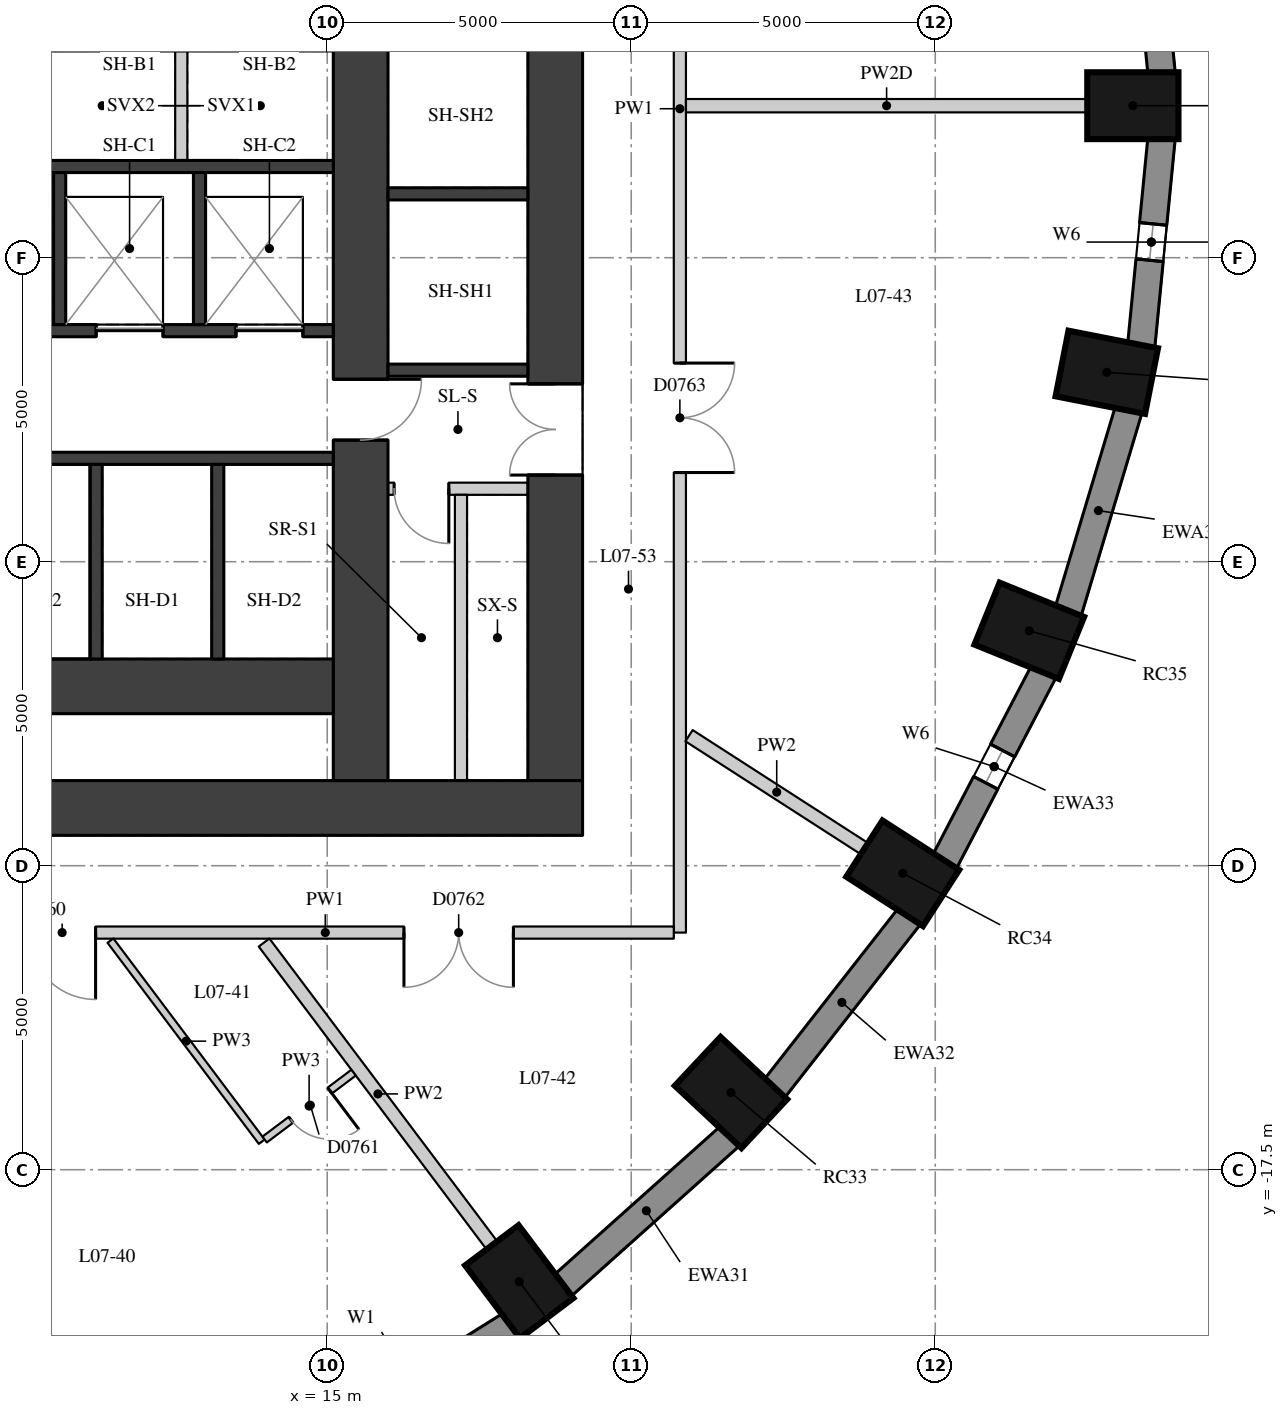
"""IFC4 building model, lengths in metres.
Left out: names, types, materials, properties, quantities, classifications, styles, units other than length and angle.
Written with IfcOpenShell. Run it as: python <this file> out.ifc"""

import sys

from ifc_helpers import new_model, si_unit, direction, frame, frame_2d, origin, origin_2d, place, context, subcontext, project, spatial, rectangle, extrude, element, fill, save


model = new_model("IFC4")
c1 = context("Model", 3, precision=1e-05, world=origin(), true_north=direction((0.0, 1.0)))
c2 = subcontext(c1, "Body", "Model", "MODEL_VIEW")
j1 = project(units=[si_unit("LENGTHUNIT", "METRE"), si_unit("PLANEANGLEUNIT", "RADIAN")], contexts=[c1])
p1 = place(None, origin())
s1 = spatial("IfcSite", under=j1, at=p1, CompositionType="ELEMENT")
p2 = place(p1, origin())
s2 = spatial("IfcBuilding", under=s1, at=p2, CompositionType="ELEMENT")
p3 = place(p2, frame((0.0, 0.0, 31.6)))
s3 = spatial("IfcBuildingStorey", under=s2, at=p3, CompositionType="ELEMENT", Elevation=31.6)
for number, where, z_axis, x_axis in (
    (1, (28.25, 0.0, 0.0), (0.0, 0.0, 1.0), (1.0, 0.0, 0.0)),
    (2, (18.159, -19.343, 0.0), (0.0, 0.0, 1.0), (0.601, -0.799, 0.0)),
    (3, (21.641, -16.23, 0.0), (0.0, 0.0, 1.0), (0.73, -0.683, 0.0)),
    (4, (24.465, -12.625, 0.0), (0.0, 0.0, 1.0), (0.841, -0.541, 0.0)),
    (5, (26.546, -8.636, 0.0), (0.0, 0.0, 1.0), (0.927, -0.376, 0.0)),
    (6, (27.821, -4.385, 0.0), (0.0, 0.0, 1.0), (0.981, -0.193, 0.0)),
):
    element("IfcColumn", number, at=place(p3, frame(where, z_axis=z_axis, x_axis=x_axis)), inside=s3, PredefinedType="COLUMN", context=c2, shape_type="SweptSolid", body=[
        extrude(rectangle(XDim=1.5, YDim=1.1, at=origin_2d()), origin(), (0.0, 0.0, 1.0), 3.3),
    ])
p4 = place(p3, frame((28.722, 0.53, 0.0), z_axis=(0.0, 0.0, 1.0), x_axis=(-0.097389581596, 0.995246336038, 0.0)))
e7 = element("IfcWall", 7, at=p4, inside=s3, PredefinedType="SOLIDWALL", context=c2, shape_type="SweptSolid", body=[
    extrude(rectangle(XDim=3.442, YDim=0.45, at=frame_2d((1.721, 0.0))), origin(), (0.0, 0.0, 1.0), 3.02),
])
p5 = place(p3, frame((14.817, -22.051, 0.0), z_axis=(0.0, 0.0, 1.0), x_axis=(0.847635480093, 0.530579016629, 0.0)))
e8 = element("IfcWall", 8, at=p5, inside=s3, PredefinedType="SOLIDWALL", context=c2, shape_type="SweptSolid", body=[
    extrude(rectangle(XDim=3.782, YDim=0.45, at=frame_2d((1.891, 0.0))), origin(), (0.0, 0.0, 1.0), 3.02),
])
p6 = place(p5, frame((0.791, 0.0, 0.4)))
e9 = element("IfcOpeningElement", 9, at=p6, cuts=e8, PredefinedType="OPENING", context=c2, shape_type="SweptSolid", body=[
    extrude(rectangle(XDim=2.2, YDim=1.75, at=frame_2d((1.1, 0.875))), frame((0.0, 0.235, 0.0), z_axis=(0.0, -1.0, 0.0), x_axis=(1.0, 0.0, 0.0)), (0.0, 0.0, 1.0), 0.47),
])
p7 = place(p3, frame((18.871, -19.407, 0.0), z_axis=(0.0, 0.0, 1.0), x_axis=(0.745526233716, 0.66647628228, 0.0)))
e10 = element("IfcWall", 10, at=p7, inside=s3, PredefinedType="SOLIDWALL", context=c2, shape_type="SweptSolid", body=[
    extrude(rectangle(XDim=3.697, YDim=0.45, at=frame_2d((1.848, 0.0))), origin(), (0.0, 0.0, 1.0), 3.02),
])
p8 = place(p3, frame((22.352, -16.17, 0.0), z_axis=(0.0, 0.0, 1.0), x_axis=(0.616661975264, 0.787228053529, 0.0)))
e11 = element("IfcWall", 11, at=p8, inside=s3, PredefinedType="SOLIDWALL", context=c2, shape_type="SweptSolid", body=[
    extrude(rectangle(XDim=3.61, YDim=0.45, at=frame_2d((1.805, 0.0))), origin(), (0.0, 0.0, 1.0), 3.02),
])
p9 = place(p3, frame((25.152, -12.437, 0.0), z_axis=(0.0, 0.0, 1.0), x_axis=(0.462492775226, 0.886623050041, 0.0)))
e12 = element("IfcWall", 12, at=p9, inside=s3, PredefinedType="SOLIDWALL", context=c2, shape_type="SweptSolid", body=[
    extrude(rectangle(XDim=3.532, YDim=0.45, at=frame_2d((1.766, 0.0))), origin(), (0.0, 0.0, 1.0), 3.02),
])
p10 = place(p9, frame((1.466, 0.0, 0.4)))
e13 = element("IfcOpeningElement", 13, at=p10, cuts=e12, PredefinedType="OPENING", context=c2, shape_type="SweptSolid", body=[
    extrude(rectangle(XDim=0.6, YDim=1.75, at=frame_2d((0.3, 0.875))), frame((0.0, 0.235, 0.0), z_axis=(0.0, -1.0, 0.0), x_axis=(1.0, 0.0, 0.0)), (0.0, 0.0, 1.0), 0.47),
])
p11 = place(p3, frame((27.185, -8.323, 0.0), z_axis=(0.0, 0.0, 1.0), x_axis=(0.287064133733, 0.957911364963, 0.0)))
e14 = element("IfcWall", 14, at=p11, inside=s3, PredefinedType="SOLIDWALL", context=c2, shape_type="SweptSolid", body=[
    extrude(rectangle(XDim=3.473, YDim=0.45, at=frame_2d((1.737, 0.0))), origin(), (0.0, 0.0, 1.0), 3.02),
])
p12 = place(p3, frame((28.387, -3.956, 0.0), z_axis=(0.0, 0.0, 1.0), x_axis=(0.097389581596, 0.995246336038, 0.0)))
e15 = element("IfcWall", 15, at=p12, inside=s3, PredefinedType="SOLIDWALL", context=c2, shape_type="SweptSolid", body=[
    extrude(rectangle(XDim=3.442, YDim=0.45, at=frame_2d((1.721, 0.0))), origin(), (0.0, 0.0, 1.0), 3.02),
])
p13 = place(p12, frame((1.421, 0.0, 0.4)))
e16 = element("IfcOpeningElement", 16, at=p13, cuts=e15, PredefinedType="OPENING", context=c2, shape_type="SweptSolid", body=[
    extrude(rectangle(XDim=0.6, YDim=1.75, at=frame_2d((0.3, 0.875))), frame((0.0, 0.235, 0.0), z_axis=(0.0, -1.0, 0.0), x_axis=(1.0, 0.0, 0.0)), (0.0, 0.0, 1.0), 0.47),
])
p14 = place(p3, frame((18.75, -11.1, 0.0), z_axis=(0.0, 0.0, 1.0), x_axis=(0.0, 1.0, 0.0)))
e17 = element("IfcWall", 17, at=p14, inside=s3, PredefinedType="SHEAR", context=c2, shape_type="SweptSolid", body=[
    extrude(rectangle(XDim=22.2, YDim=0.9, at=frame_2d((11.1, 0.0))), origin(), (0.0, 0.0, 1.0), 3.02),
])
p15 = place(p14, frame((16.175, 0.0, 0.0)))
e18 = element("IfcOpeningElement", 18, at=p15, cuts=e17, PredefinedType="OPENING", context=c2, shape_type="SweptSolid", body=[
    extrude(rectangle(XDim=1.5, YDim=2.1, at=frame_2d((0.75, 1.05))), frame((0.0, 0.46, 0.0), z_axis=(0.0, -1.0, 0.0), x_axis=(1.0, 0.0, 0.0)), (0.0, 0.0, 1.0), 0.92),
])
p16 = place(p14, frame((5.025, 0.0, 0.0)))
e19 = element("IfcOpeningElement", 19, at=p16, cuts=e17, PredefinedType="OPENING", context=c2, shape_type="SweptSolid", body=[
    extrude(rectangle(XDim=1.5, YDim=2.1, at=frame_2d((0.75, 1.05))), frame((0.0, 0.46, 0.0), z_axis=(0.0, -1.0, 0.0), x_axis=(1.0, 0.0, 0.0)), (0.0, 0.0, 1.0), 0.92),
])
p17 = place(p3, frame((4.0, -11.55, 0.0), z_axis=(0.0, 0.0, 1.0), x_axis=(1.0, 0.0, 0.0)))
e20 = element("IfcWall", 20, at=p17, inside=s3, PredefinedType="SHEAR", context=c2, shape_type="SweptSolid", body=[
    extrude(rectangle(XDim=15.2, YDim=0.9, at=frame_2d((7.6, 0.0))), origin(), (0.0, 0.0, 1.0), 3.02),
])
p18 = place(p3, frame((15.55, -11.1, 0.0), z_axis=(0.0, 0.0, 1.0), x_axis=(0.0, 1.0, 0.0)))
e21 = element("IfcWall", 21, at=p18, inside=s3, PredefinedType="SHEAR", context=c2, shape_type="SweptSolid", body=[
    extrude(rectangle(XDim=22.2, YDim=0.9, at=frame_2d((11.1, 0.0))), origin(), (0.0, 0.0, 1.0), 3.02),
])
p19 = place(p18, frame((15.6, 0.0, 0.0)))
e22 = element("IfcOpeningElement", 22, at=p19, cuts=e21, PredefinedType="OPENING", context=c2, shape_type="SweptSolid", body=[
    extrude(rectangle(XDim=1.0, YDim=2.1, at=frame_2d((0.5, 1.05))), frame((0.0, 0.46, 0.0), z_axis=(0.0, -1.0, 0.0), x_axis=(1.0, 0.0, 0.0)), (0.0, 0.0, 1.0), 0.92),
])
p20 = place(p18, frame((5.6, 0.0, 0.0)))
e23 = element("IfcOpeningElement", 23, at=p20, cuts=e21, PredefinedType="OPENING", context=c2, shape_type="SweptSolid", body=[
    extrude(rectangle(XDim=1.0, YDim=2.1, at=frame_2d((0.5, 1.05))), frame((0.0, 0.46, 0.0), z_axis=(0.0, -1.0, 0.0), x_axis=(1.0, 0.0, 0.0)), (0.0, 0.0, 1.0), 0.92),
])
p21 = place(p3, frame((4.9, -9.55, 0.0), z_axis=(0.0, 0.0, 1.0), x_axis=(1.0, 0.0, 0.0)))
e24 = element("IfcWall", 24, at=p21, inside=s3, PredefinedType="SHEAR", context=c2, shape_type="SweptSolid", body=[
    extrude(rectangle(XDim=10.2, YDim=0.9, at=frame_2d((5.1, 0.0))), origin(), (0.0, 0.0, 1.0), 3.02),
])
p22 = place(p3, frame((4.9, -1.0, 0.0), z_axis=(0.0, 0.0, 1.0), x_axis=(1.0, 0.0, 0.0)))
e25 = element("IfcWall", 25, at=p22, inside=s3, PredefinedType="SHEAR", context=c2, shape_type="SweptSolid", body=[
    extrude(rectangle(XDim=10.2, YDim=0.2, at=frame_2d((5.1, 0.0))), origin(), (0.0, 0.0, 1.0), 3.02),
])
p23 = place(p3, frame((4.9, -3.7, 0.0), z_axis=(0.0, 0.0, 1.0), x_axis=(1.0, 0.0, 0.0)))
e26 = element("IfcWall", 26, at=p23, inside=s3, PredefinedType="SHEAR", context=c2, shape_type="SweptSolid", body=[
    extrude(rectangle(XDim=10.2, YDim=0.2, at=frame_2d((5.1, 0.0))), origin(), (0.0, 0.0, 1.0), 3.02),
])
p24 = place(p23, frame((6.3, 0.0, 0.0)))
e27 = element("IfcOpeningElement", 27, at=p24, cuts=e26, PredefinedType="OPENING", context=c2, shape_type="SweptSolid", body=[
    extrude(rectangle(XDim=1.1, YDim=2.1, at=frame_2d((0.55, 1.05))), frame((0.0, 0.11, 0.0), z_axis=(0.0, -1.0, 0.0), x_axis=(1.0, 0.0, 0.0)), (0.0, 0.0, 1.0), 0.22),
])
p25 = place(p23, frame((8.6, 0.0, 0.0)))
e28 = element("IfcOpeningElement", 28, at=p25, cuts=e26, PredefinedType="OPENING", context=c2, shape_type="SweptSolid", body=[
    extrude(rectangle(XDim=1.1, YDim=2.1, at=frame_2d((0.55, 1.05))), frame((0.0, 0.11, 0.0), z_axis=(0.0, -1.0, 0.0), x_axis=(1.0, 0.0, 0.0)), (0.0, 0.0, 1.0), 0.22),
])
p26 = place(p3, frame((4.9, -5.8, 0.0), z_axis=(0.0, 0.0, 1.0), x_axis=(1.0, 0.0, 0.0)))
e29 = element("IfcWall", 29, at=p26, inside=s3, PredefinedType="SHEAR", context=c2, shape_type="SweptSolid", body=[
    extrude(rectangle(XDim=10.2, YDim=0.2, at=frame_2d((5.1, 0.0))), origin(), (0.0, 0.0, 1.0), 3.02),
])
for number, where, z_axis, x_axis in (
    (30, (11.2, -9.1, 0.0), (0.0, 0.0, 1.0), (0.0, 1.0, 0.0)),
    (31, (13.2, -9.1, 0.0), (0.0, 0.0, 1.0), (0.0, 1.0, 0.0)),
):
    element("IfcWall", number, at=place(p3, frame(where, z_axis=z_axis, x_axis=x_axis)), inside=s3, PredefinedType="SHEAR", context=c2, shape_type="SweptSolid", body=[
        extrude(rectangle(XDim=3.2, YDim=0.2, at=frame_2d((1.6, 0.0))), origin(), (0.0, 0.0, 1.0), 3.02),
    ])
for number, where, z_axis, x_axis in (
    (32, (10.6, -3.6, 0.0), (0.0, 0.0, 1.0), (0.0, 1.0, 0.0)),
    (33, (12.9, -3.6, 0.0), (0.0, 0.0, 1.0), (0.0, 1.0, 0.0)),
):
    element("IfcWall", number, at=place(p3, frame(where, z_axis=z_axis, x_axis=x_axis)), inside=s3, PredefinedType="SHEAR", context=c2, shape_type="SweptSolid", body=[
        extrude(rectangle(XDim=2.5, YDim=0.2, at=frame_2d((1.25, 0.0))), origin(), (0.0, 0.0, 1.0), 3.02),
    ])
p27 = place(p3, frame((12.6, -0.9, 0.0), z_axis=(0.0, 0.0, 1.0), x_axis=(0.0, 1.0, 0.0)))
e34 = element("IfcWall", 34, at=p27, inside=s3, PredefinedType="PARTITIONING", context=c2, shape_type="SweptSolid", body=[
    extrude(rectangle(XDim=1.8, YDim=0.2, at=frame_2d((0.9, 0.0))), origin(), (0.0, 0.0, 1.0), 3.02),
])
for number, where, z_axis, x_axis in (
    (35, (16.0, -4.35, 0.0), (0.0, 0.0, 1.0), (1.0, 0.0, 0.0)),
    (36, (16.0, -1.45, 0.0), (0.0, 0.0, 1.0), (1.0, 0.0, 0.0)),
):
    element("IfcWall", number, at=place(p3, frame(where, z_axis=z_axis, x_axis=x_axis)), inside=s3, PredefinedType="SHEAR", context=c2, shape_type="SweptSolid", body=[
        extrude(rectangle(XDim=2.3, YDim=0.2, at=frame_2d((1.15, 0.0))), origin(), (0.0, 0.0, 1.0), 3.02),
    ])
p28 = place(p3, frame((16.0, -6.3, 0.0), z_axis=(0.0, 0.0, 1.0), x_axis=(1.0, 0.0, 0.0)))
e37 = element("IfcWall", 37, at=p28, inside=s3, PredefinedType="PARTITIONING", context=c2, shape_type="SweptSolid", body=[
    extrude(rectangle(XDim=2.3, YDim=0.2, at=frame_2d((1.15, 0.0))), origin(), (0.0, 0.0, 1.0), 3.02),
])
p29 = place(p28, frame((0.1, 0.0, 0.0)))
e38 = element("IfcOpeningElement", 38, at=p29, cuts=e37, PredefinedType="OPENING", context=c2, shape_type="SweptSolid", body=[
    extrude(rectangle(XDim=0.9, YDim=2.1, at=frame_2d((0.45, 1.05))), frame((0.0, 0.11, 0.0), z_axis=(0.0, -1.0, 0.0), x_axis=(1.0, 0.0, 0.0)), (0.0, 0.0, 1.0), 0.22),
])
p30 = place(p3, frame((17.2, -11.1, 0.0), z_axis=(0.0, 0.0, 1.0), x_axis=(0.0, 1.0, 0.0)))
e39 = element("IfcWall", 39, at=p30, inside=s3, PredefinedType="PARTITIONING", context=c2, shape_type="SweptSolid", body=[
    extrude(rectangle(XDim=4.7, YDim=0.2, at=frame_2d((2.35, 0.0))), origin(), (0.0, 0.0, 1.0), 3.02),
])
p31 = place(p3, frame((20.8, 13.5, 0.0), z_axis=(0.0, 0.0, 1.0), x_axis=(0.0, -1.0, 0.0)))
e40 = element("IfcWall", 40, at=p31, inside=s3, PredefinedType="PARTITIONING", context=c2, shape_type="SweptSolid", body=[
    extrude(rectangle(XDim=27.1, YDim=0.2, at=frame_2d((13.55, 0.0))), origin(), (0.0, 0.0, 1.0), 3.02),
])
p32 = place(p31, frame((17.733, 0.0, 0.0)))
e41 = element("IfcOpeningElement", 41, at=p32, cuts=e40, PredefinedType="OPENING", context=c2, shape_type="SweptSolid", body=[
    extrude(rectangle(XDim=1.8, YDim=2.1, at=frame_2d((0.9, 1.05))), frame((0.0, 0.11, 0.0), z_axis=(0.0, -1.0, 0.0), x_axis=(1.0, 0.0, 0.0)), (0.0, 0.0, 1.0), 0.22),
])
p33 = place(p31, frame((7.467, 0.0, 0.0)))
e42 = element("IfcOpeningElement", 42, at=p33, cuts=e40, PredefinedType="OPENING", context=c2, shape_type="SweptSolid", body=[
    extrude(rectangle(XDim=1.8, YDim=2.1, at=frame_2d((0.9, 1.05))), frame((0.0, 0.11, 0.0), z_axis=(0.0, -1.0, 0.0), x_axis=(1.0, 0.0, 0.0)), (0.0, 0.0, 1.0), 0.22),
])
p34 = place(p3, frame((20.7, -13.6, 0.0), z_axis=(0.0, 0.0, 1.0), x_axis=(-1.0, 0.0, 0.0)))
e43 = element("IfcWall", 43, at=p34, inside=s3, PredefinedType="PARTITIONING", context=c2, shape_type="SweptSolid", body=[
    extrude(rectangle(XDim=11.463, YDim=0.2, at=frame_2d((5.731, 0.0))), origin(), (0.0, 0.0, 1.0), 3.02),
])
p35 = place(p34, frame((9.509, 0.0, 0.0)))
e44 = element("IfcOpeningElement", 44, at=p35, cuts=e43, PredefinedType="OPENING", context=c2, shape_type="SweptSolid", body=[
    extrude(rectangle(XDim=1.1, YDim=2.1, at=frame_2d((0.55, 1.05))), frame((0.0, 0.11, 0.0), z_axis=(0.0, -1.0, 0.0), x_axis=(1.0, 0.0, 0.0)), (0.0, 0.0, 1.0), 0.22),
])
p36 = place(p34, frame((2.638, 0.0, 0.0)))
e45 = element("IfcOpeningElement", 45, at=p36, cuts=e43, PredefinedType="OPENING", context=c2, shape_type="SweptSolid", body=[
    extrude(rectangle(XDim=1.8, YDim=2.1, at=frame_2d((0.9, 1.05))), frame((0.0, 0.11, 0.0), z_axis=(0.0, -1.0, 0.0), x_axis=(1.0, 0.0, 0.0)), (0.0, 0.0, 1.0), 0.22),
])
p37 = place(p3, frame((27.5, 0.0, 0.0), z_axis=(0.0, 0.0, 1.0), x_axis=(-1.0, 0.0, 0.0)))
e46 = element("IfcWall", 46, at=p37, inside=s3, PredefinedType="PARTITIONING", context=c2, shape_type="SweptSolid", body=[
    extrude(rectangle(XDim=6.6, YDim=0.22, at=frame_2d((3.3, 0.0))), origin(), (0.0, 0.0, 1.0), 2.47),
])
p38 = place(p3, frame((17.708, -18.743, 0.0), z_axis=(0.0, 0.0, 1.0), x_axis=(-0.601177883261, 0.799115231164, 0.0)))
e47 = element("IfcWall", 47, at=p38, inside=s3, PredefinedType="PARTITIONING", context=c2, shape_type="SweptSolid", body=[
    extrude(rectangle(XDim=6.231, YDim=0.22, at=frame_2d((3.116, 0.0))), origin(), (0.0, 0.0, 1.0), 3.02),
])
p39 = place(p3, frame((23.835, -12.219, 0.0), z_axis=(0.0, 0.0, 1.0), x_axis=(-0.840694872373, 0.541509124176, 0.0)))
e48 = element("IfcWall", 48, at=p39, inside=s3, PredefinedType="PARTITIONING", context=c2, shape_type="SweptSolid", body=[
    extrude(rectangle(XDim=3.43, YDim=0.22, at=frame_2d((1.715, 0.0))), origin(), (0.0, 0.0, 1.0), 3.02),
])
p40 = place(p3, frame((11.435, -13.732, 0.0), z_axis=(0.0, 0.0, 1.0), x_axis=(0.601178939522, -0.799114436533, 0.0)))
e49 = element("IfcWall", 49, at=p40, inside=s3, PredefinedType="PARTITIONING", context=c2, shape_type="SweptSolid", body=[
    extrude(rectangle(XDim=4.139, YDim=0.12, at=frame_2d((2.07, 0.0))), origin(), (0.0, 0.0, 1.0), 3.02),
])
p41 = place(p3, frame((13.971, -17.004, 0.0), z_axis=(0.0, 0.0, 1.0), x_axis=(0.799231057954, 0.60102388971, 0.0)))
e50 = element("IfcWall", 50, at=p41, inside=s3, PredefinedType="PARTITIONING", context=c2, shape_type="SweptSolid", body=[
    extrude(rectangle(XDim=1.83, YDim=0.12, at=frame_2d((0.915, 0.0))), origin(), (0.0, 0.0, 1.0), 3.02),
])
p42 = place(p41, frame((0.54, 0.0, 0.0)))
e51 = element("IfcOpeningElement", 51, at=p42, cuts=e50, PredefinedType="OPENING", context=c2, shape_type="SweptSolid", body=[
    extrude(rectangle(XDim=0.8, YDim=2.1, at=frame_2d((0.4, 1.05))), frame((0.0, 0.07, 0.0), z_axis=(0.0, -1.0, 0.0), x_axis=(1.0, 0.0, 0.0)), (0.0, 0.0, 1.0), 0.14),
])
p43 = place(p10, origin())
e52 = element("IfcWindow", 52, at=p43, inside=s3, PartitioningType="SINGLE_PANEL", PredefinedType="WINDOW", context=c2, shape_type="SweptSolid", body=[
    extrude(rectangle(XDim=0.6, YDim=1.75, at=frame_2d((0.3, 0.875))), frame((0.0, 0.035, 0.0), z_axis=(0.0, -1.0, 0.0), x_axis=(1.0, 0.0, 0.0)), (0.0, 0.0, 1.0), 0.06),
])
fill(e13, e52)
p44 = place(p13, origin())
e53 = element("IfcWindow", 53, at=p44, inside=s3, PartitioningType="SINGLE_PANEL", PredefinedType="WINDOW", context=c2, shape_type="SweptSolid", body=[
    extrude(rectangle(XDim=0.6, YDim=1.75, at=frame_2d((0.3, 0.875))), frame((0.0, 0.035, 0.0), z_axis=(0.0, -1.0, 0.0), x_axis=(1.0, 0.0, 0.0)), (0.0, 0.0, 1.0), 0.06),
])
fill(e16, e53)
p45 = place(p16, origin())
e54 = element("IfcDoor", 54, at=p45, inside=s3, OperationType="DOUBLE_DOOR_SINGLE_SWING", PredefinedType="DOOR", context=c2, shape_type="SweptSolid", body=[
    extrude(rectangle(XDim=1.5, YDim=2.1, at=frame_2d((0.75, 1.05))), frame((0.0, 0.025, 0.0), z_axis=(0.0, -1.0, 0.0), x_axis=(1.0, 0.0, 0.0)), (0.0, 0.0, 1.0), 0.05),
])
fill(e19, e54)
p46 = place(p24, origin())
e55 = element("IfcDoor", 55, at=p46, inside=s3, OperationType="DOUBLE_DOOR_SLIDING", PredefinedType="DOOR", context=c2, shape_type="SweptSolid", body=[
    extrude(rectangle(XDim=1.1, YDim=2.1, at=frame_2d((0.55, 1.05))), frame((0.0, 0.025, 0.0), z_axis=(0.0, -1.0, 0.0), x_axis=(1.0, 0.0, 0.0)), (0.0, 0.0, 1.0), 0.05),
])
fill(e27, e55)
p47 = place(p25, origin())
e56 = element("IfcDoor", 56, at=p47, inside=s3, OperationType="DOUBLE_DOOR_SLIDING", PredefinedType="DOOR", context=c2, shape_type="SweptSolid", body=[
    extrude(rectangle(XDim=1.1, YDim=2.1, at=frame_2d((0.55, 1.05))), frame((0.0, 0.025, 0.0), z_axis=(0.0, -1.0, 0.0), x_axis=(1.0, 0.0, 0.0)), (0.0, 0.0, 1.0), 0.05),
])
fill(e28, e56)
p48 = place(p20, origin())
e57 = element("IfcDoor", 57, at=p48, inside=s3, OperationType="SINGLE_SWING_LEFT", PredefinedType="DOOR", context=c2, shape_type="SweptSolid", body=[
    extrude(rectangle(XDim=1.0, YDim=2.1, at=frame_2d((0.5, 1.05))), frame((0.0, 0.025, 0.0), z_axis=(0.0, -1.0, 0.0), x_axis=(1.0, 0.0, 0.0)), (0.0, 0.0, 1.0), 0.05),
])
fill(e23, e57)
p49 = place(p29, origin())
e58 = element("IfcDoor", 58, at=p49, inside=s3, OperationType="SINGLE_SWING_LEFT", PredefinedType="DOOR", context=c2, shape_type="SweptSolid", body=[
    extrude(rectangle(XDim=0.9, YDim=2.1, at=frame_2d((0.45, 1.05))), frame((0.0, 0.025, 0.0), z_axis=(0.0, -1.0, 0.0), x_axis=(1.0, 0.0, 0.0)), (0.0, 0.0, 1.0), 0.05),
])
fill(e38, e58)
p50 = place(p35, origin())
e59 = element("IfcDoor", 59, at=p50, inside=s3, OperationType="SINGLE_SWING_LEFT", PredefinedType="DOOR", context=c2, shape_type="SweptSolid", body=[
    extrude(rectangle(XDim=1.1, YDim=2.1, at=frame_2d((0.55, 1.05))), frame((0.0, 0.025, 0.0), z_axis=(0.0, -1.0, 0.0), x_axis=(1.0, 0.0, 0.0)), (0.0, 0.0, 1.0), 0.05),
])
fill(e44, e59)
p51 = place(p42, origin())
e60 = element("IfcDoor", 60, at=p51, inside=s3, OperationType="SINGLE_SWING_LEFT", PredefinedType="DOOR", context=c2, shape_type="SweptSolid", body=[
    extrude(rectangle(XDim=0.8, YDim=2.1, at=frame_2d((0.4, 1.05))), frame((0.0, 0.025, 0.0), z_axis=(0.0, -1.0, 0.0), x_axis=(1.0, 0.0, 0.0)), (0.0, 0.0, 1.0), 0.05),
])
fill(e51, e60)
p52 = place(p36, origin())
e61 = element("IfcDoor", 61, at=p52, inside=s3, OperationType="DOUBLE_DOOR_SINGLE_SWING", PredefinedType="DOOR", context=c2, shape_type="SweptSolid", body=[
    extrude(rectangle(XDim=1.8, YDim=2.1, at=frame_2d((0.9, 1.05))), frame((0.0, 0.025, 0.0), z_axis=(0.0, -1.0, 0.0), x_axis=(1.0, 0.0, 0.0)), (0.0, 0.0, 1.0), 0.05),
])
fill(e45, e61)
p53 = place(p32, origin())
e62 = element("IfcDoor", 62, at=p53, inside=s3, OperationType="DOUBLE_DOOR_SINGLE_SWING", PredefinedType="DOOR", context=c2, shape_type="SweptSolid", body=[
    extrude(rectangle(XDim=1.8, YDim=2.1, at=frame_2d((0.9, 1.05))), frame((0.0, 0.025, 0.0), z_axis=(0.0, -1.0, 0.0), x_axis=(1.0, 0.0, 0.0)), (0.0, 0.0, 1.0), 0.05),
])
fill(e41, e62)
save(model, sys.argv[1])
